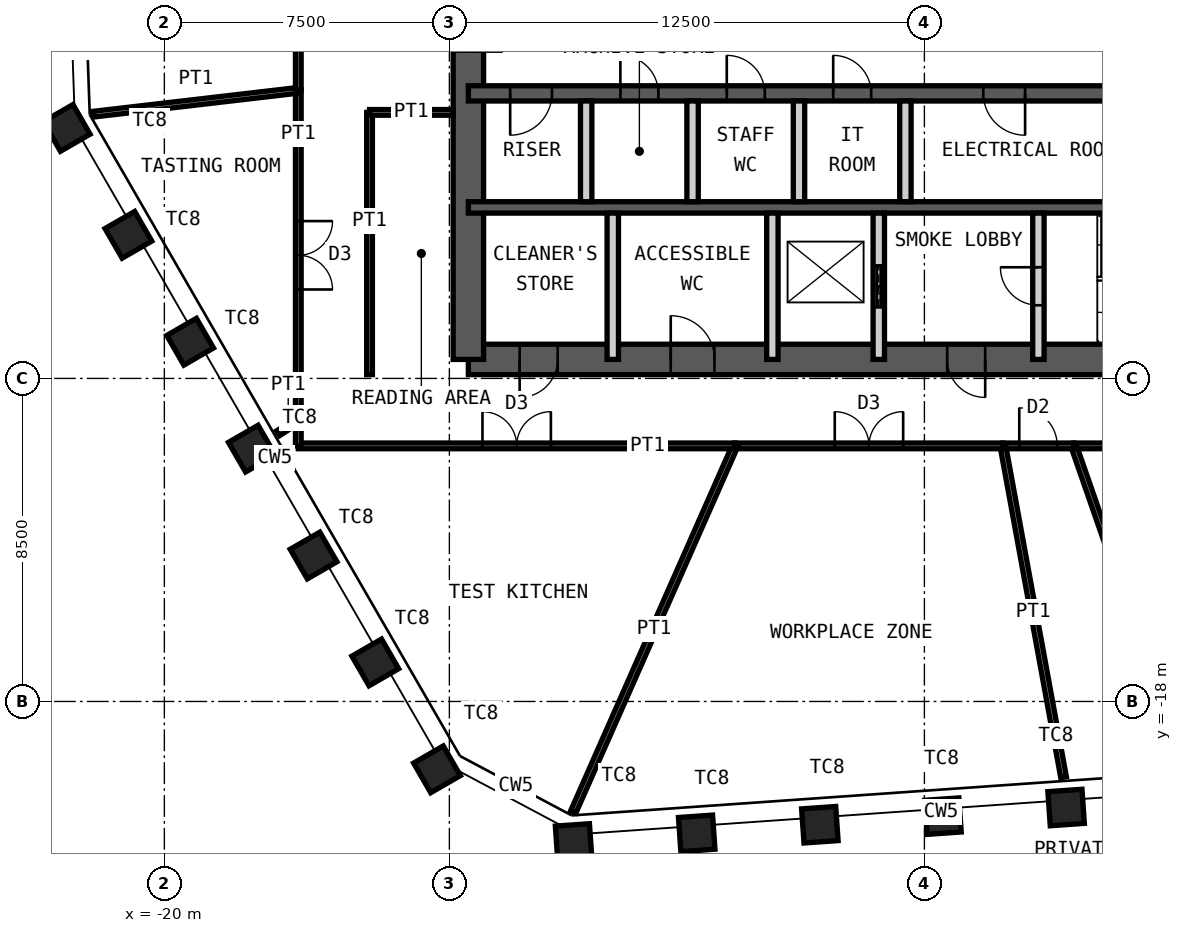
"""IFC4 building model, lengths in metres.
Left out: names, types, materials, properties, quantities, classifications, styles, units other than length and angle.
Written with IfcOpenShell. Run it as: python <this file> out.ifc"""

import sys

from ifc_helpers import new_model, si_unit, direction, frame, frame_2d, origin, origin_2d, place, context, subcontext, project, spatial, rectangle, hollow_rectangle, extrude, element, fill, save


model = new_model("IFC4")
c1 = context("Model", 3, precision=1e-05, world=origin(), true_north=direction((0.0, 1.0)))
c2 = subcontext(c1, "Body", "Model", "MODEL_VIEW")
j1 = project(units=[si_unit("LENGTHUNIT", "METRE"), si_unit("PLANEANGLEUNIT", "RADIAN")], contexts=[c1])
p1 = place(None, origin())
s1 = spatial("IfcSite", under=j1, at=p1, CompositionType="ELEMENT")
p2 = place(p1, origin())
s2 = spatial("IfcBuilding", under=s1, at=p2, CompositionType="ELEMENT")
p3 = place(p2, frame((0.0, 0.0, 316.6)))
s3 = spatial("IfcBuildingStorey", under=s2, at=p3, CompositionType="ELEMENT", Elevation=316.6)
for number, where, z_axis, x_axis in (
    (1, (3.729, -20.791, 0.0), (0.0, 0.0, 1.0), (0.998, 0.07, 0.0)),
    (2, (0.489, -21.017, 0.0), (0.0, 0.0, 1.0), (0.998, 0.07, 0.0)),
    (3, (-2.751, -21.244, 0.0), (0.0, 0.0, 1.0), (0.998, 0.07, 0.0)),
    (4, (-5.991, -21.47, 0.0), (0.0, 0.0, 1.0), (0.998, 0.07, 0.0)),
    (5, (-9.231, -21.697, 0.0), (0.0, 0.0, 1.0), (0.998, 0.07, 0.0)),
    (6, (-12.825, -19.786, 0.0), (0.0, 0.0, 1.0), (0.5, -0.866, 0.0)),
    (7, (-14.449, -16.973, 0.0), (0.0, 0.0, 1.0), (0.5, -0.866, 0.0)),
    (8, (-16.073, -14.16, 0.0), (0.0, 0.0, 1.0), (0.5, -0.866, 0.0)),
    (9, (-17.698, -11.347, 0.0), (0.0, 0.0, 1.0), (0.5, -0.866, 0.0)),
    (10, (-19.322, -8.534, 0.0), (0.0, 0.0, 1.0), (0.5, -0.866, 0.0)),
    (11, (-20.946, -5.721, 0.0), (0.0, 0.0, 1.0), (0.5, -0.866, 0.0)),
    (12, (-22.57, -2.908, 0.0), (0.0, 0.0, 1.0), (0.5, -0.866, 0.0)),
):
    element("IfcColumn", number, at=place(p3, frame(where, z_axis=z_axis, x_axis=x_axis)), inside=s3, PredefinedType="COLUMN", context=c2, shape_type="SweptSolid", body=[
        extrude(hollow_rectangle(XDim=0.9, YDim=0.9, WallThickness=0.05, at=origin_2d()), origin(), (0.0, 0.0, 1.0), 4.2),
    ])
p4 = place(p3, frame((-12.0, -9.0, 0.0), z_axis=(0.0, 0.0, 1.0), x_axis=(1.0, 0.0, 0.0)))
e13 = element("IfcWall", 13, at=p4, inside=s3, PredefinedType="SHEAR", context=c2, shape_type="SweptSolid", body=[
    extrude(rectangle(XDim=24.0, YDim=0.8, at=frame_2d((12.0, 0.0))), origin(), (0.0, 0.0, 1.0), 4.2),
])
p5 = place(p4, frame((1.35, 0.0, 0.0)))
e14 = element("IfcOpeningElement", 14, at=p5, cuts=e13, PredefinedType="OPENING", context=c2, shape_type="SweptSolid", body=[
    extrude(rectangle(XDim=1.0, YDim=2.1, at=frame_2d((0.5, 1.05))), frame((0.0, 0.41, 0.0), z_axis=(0.0, -1.0, 0.0), x_axis=(1.0, 0.0, 0.0)), (0.0, 0.0, 1.0), 0.82),
])
p6 = place(p4, frame((5.325, 0.0, 0.0)))
e15 = element("IfcOpeningElement", 15, at=p6, cuts=e13, PredefinedType="OPENING", context=c2, shape_type="SweptSolid", body=[
    extrude(rectangle(XDim=1.15, YDim=2.1, at=frame_2d((0.575, 1.05))), frame((0.0, 0.41, 0.0), z_axis=(0.0, -1.0, 0.0), x_axis=(1.0, 0.0, 0.0)), (0.0, 0.0, 1.0), 0.82),
])
p7 = place(p4, frame((12.6, 0.0, 0.0)))
e16 = element("IfcOpeningElement", 16, at=p7, cuts=e13, PredefinedType="OPENING", context=c2, shape_type="SweptSolid", body=[
    extrude(rectangle(XDim=1.0, YDim=2.1, at=frame_2d((0.5, 1.05))), frame((0.0, 0.41, 0.0), z_axis=(0.0, -1.0, 0.0), x_axis=(1.0, 0.0, 0.0)), (0.0, 0.0, 1.0), 0.82),
])
p8 = place(p3, frame((-12.0, -9.0, 0.0), z_axis=(0.0, 0.0, 1.0), x_axis=(0.0, 1.0, 0.0)))
e17 = element("IfcWall", 17, at=p8, inside=s3, PredefinedType="SHEAR", context=c2, shape_type="SweptSolid", body=[
    extrude(rectangle(XDim=18.0, YDim=0.8, at=frame_2d((9.0, 0.0))), origin(), (0.0, 0.0, 1.0), 4.2),
])
p9 = place(p8, frame((8.1, 0.0, 0.0)))
e18 = element("IfcOpeningElement", 18, at=p9, cuts=e17, PredefinedType="OPENING", context=c2, shape_type="SweptSolid", body=[
    extrude(rectangle(XDim=1.8, YDim=2.1, at=frame_2d((0.9, 1.05))), frame((0.0, 0.41, 0.0), z_axis=(0.0, -1.0, 0.0), x_axis=(1.0, 0.0, 0.0)), (0.0, 0.0, 1.0), 0.82),
])
p10 = place(p3, frame((-12.0, -2.0, 0.0), z_axis=(0.0, 0.0, 1.0), x_axis=(1.0, 0.0, 0.0)))
e19 = element("IfcWall", 19, at=p10, inside=s3, PredefinedType="SHEAR", context=c2, shape_type="SweptSolid", body=[
    extrude(rectangle(XDim=24.0, YDim=0.4, at=frame_2d((12.0, 0.0))), origin(), (0.0, 0.0, 1.0), 4.2),
])
p11 = place(p10, frame((1.1, 0.0, 0.0)))
e20 = element("IfcOpeningElement", 20, at=p11, cuts=e19, PredefinedType="OPENING", context=c2, shape_type="SweptSolid", body=[
    extrude(rectangle(XDim=1.1, YDim=2.1, at=frame_2d((0.55, 1.05))), frame((0.0, 0.21, 0.0), z_axis=(0.0, -1.0, 0.0), x_axis=(1.0, 0.0, 0.0)), (0.0, 0.0, 1.0), 0.42),
])
p12 = place(p10, frame((13.55, 0.0, 0.0)))
e21 = element("IfcOpeningElement", 21, at=p12, cuts=e19, PredefinedType="OPENING", context=c2, shape_type="SweptSolid", body=[
    extrude(rectangle(XDim=1.1, YDim=2.1, at=frame_2d((0.55, 1.05))), frame((0.0, 0.21, 0.0), z_axis=(0.0, -1.0, 0.0), x_axis=(1.0, 0.0, 0.0)), (0.0, 0.0, 1.0), 0.42),
])
p13 = place(p10, frame((20.7, 0.0, 0.0)))
e22 = element("IfcOpeningElement", 22, at=p13, cuts=e19, PredefinedType="OPENING", context=c2, shape_type="SweptSolid", body=[
    extrude(rectangle(XDim=1.1, YDim=2.1, at=frame_2d((0.55, 1.05))), frame((0.0, 0.21, 0.0), z_axis=(0.0, -1.0, 0.0), x_axis=(1.0, 0.0, 0.0)), (0.0, 0.0, 1.0), 0.42),
])
p14 = place(p10, frame((4.0, 0.0, 0.0)))
e23 = element("IfcOpeningElement", 23, at=p14, cuts=e19, PredefinedType="OPENING", context=c2, shape_type="SweptSolid", body=[
    extrude(rectangle(XDim=1.0, YDim=2.1, at=frame_2d((0.5, 1.05))), frame((0.0, 0.21, 0.0), z_axis=(0.0, -1.0, 0.0), x_axis=(1.0, 0.0, 0.0)), (0.0, 0.0, 1.0), 0.42),
])
p15 = place(p10, frame((6.8, 0.0, 0.0)))
e24 = element("IfcOpeningElement", 24, at=p15, cuts=e19, PredefinedType="OPENING", context=c2, shape_type="SweptSolid", body=[
    extrude(rectangle(XDim=1.0, YDim=2.1, at=frame_2d((0.5, 1.05))), frame((0.0, 0.21, 0.0), z_axis=(0.0, -1.0, 0.0), x_axis=(1.0, 0.0, 0.0)), (0.0, 0.0, 1.0), 0.42),
])
p16 = place(p10, frame((9.6, 0.0, 0.0)))
e25 = element("IfcOpeningElement", 25, at=p16, cuts=e19, PredefinedType="OPENING", context=c2, shape_type="SweptSolid", body=[
    extrude(rectangle(XDim=1.0, YDim=2.1, at=frame_2d((0.5, 1.05))), frame((0.0, 0.21, 0.0), z_axis=(0.0, -1.0, 0.0), x_axis=(1.0, 0.0, 0.0)), (0.0, 0.0, 1.0), 0.42),
])
p17 = place(p3, frame((-12.0, -5.0, 0.0), z_axis=(0.0, 0.0, 1.0), x_axis=(1.0, 0.0, 0.0)))
e26 = element("IfcWall", 26, at=p17, inside=s3, PredefinedType="SHEAR", context=c2, shape_type="SweptSolid", body=[
    extrude(rectangle(XDim=24.0, YDim=0.3, at=frame_2d((12.0, 0.0))), origin(), (0.0, 0.0, 1.0), 4.2),
])
for number, where, z_axis, x_axis in (
    (27, (-8.9, -4.85, 0.0), (0.0, 0.0, 1.0), (0.0, 1.0, 0.0)),
    (28, (-6.1, -4.85, 0.0), (0.0, 0.0, 1.0), (0.0, 1.0, 0.0)),
    (29, (-3.3, -4.85, 0.0), (0.0, 0.0, 1.0), (0.0, 1.0, 0.0)),
    (30, (-0.5, -4.85, 0.0), (0.0, 0.0, 1.0), (0.0, 1.0, 0.0)),
):
    element("IfcWall", number, at=place(p3, frame(where, z_axis=z_axis, x_axis=x_axis)), inside=s3, PredefinedType="PARTITIONING", context=c2, shape_type="SweptSolid", body=[
        extrude(rectangle(XDim=2.65, YDim=0.3, at=frame_2d((1.325, 0.0))), origin(), (0.0, 0.0, 1.0), 3.98),
    ])
for number, where, z_axis, x_axis in (
    (31, (-8.2, -9.0, 0.0), (0.0, 0.0, 1.0), (0.0, 1.0, 0.0)),
    (32, (-4.0, -9.0, 0.0), (0.0, 0.0, 1.0), (0.0, 1.0, 0.0)),
):
    element("IfcWall", number, at=place(p3, frame(where, z_axis=z_axis, x_axis=x_axis)), inside=s3, PredefinedType="PARTITIONING", context=c2, shape_type="SweptSolid", body=[
        extrude(rectangle(XDim=3.85, YDim=0.3, at=frame_2d((1.925, 0.0))), origin(), (0.0, 0.0, 1.0), 3.98),
    ])
p18 = place(p3, frame((-1.2, -9.0, 0.0), z_axis=(0.0, 0.0, 1.0), x_axis=(0.0, 1.0, 0.0)))
e33 = element("IfcWall", 33, at=p18, inside=s3, PredefinedType="PARTITIONING", context=c2, shape_type="SweptSolid", body=[
    extrude(rectangle(XDim=3.85, YDim=0.3, at=frame_2d((1.925, 0.0))), origin(), (0.0, 0.0, 1.0), 3.98),
])
p19 = place(p18, frame((1.375, 0.0, 0.0)))
e34 = element("IfcOpeningElement", 34, at=p19, cuts=e33, PredefinedType="OPENING", context=c2, shape_type="SweptSolid", body=[
    extrude(rectangle(XDim=1.1, YDim=2.4, at=frame_2d((0.55, 1.2))), frame((0.0, 0.16, 0.0), z_axis=(0.0, -1.0, 0.0), x_axis=(1.0, 0.0, 0.0)), (0.0, 0.0, 1.0), 0.32),
])
p20 = place(p3, frame((3.0, -9.0, 0.0), z_axis=(0.0, 0.0, 1.0), x_axis=(0.0, 1.0, 0.0)))
e35 = element("IfcWall", 35, at=p20, inside=s3, PredefinedType="PARTITIONING", context=c2, shape_type="SweptSolid", body=[
    extrude(rectangle(XDim=3.85, YDim=0.3, at=frame_2d((1.925, 0.0))), origin(), (0.0, 0.0, 1.0), 3.98),
])
p21 = place(p20, frame((1.425, 0.0, 0.0)))
e36 = element("IfcOpeningElement", 36, at=p21, cuts=e35, PredefinedType="OPENING", context=c2, shape_type="SweptSolid", body=[
    extrude(rectangle(XDim=1.0, YDim=2.1, at=frame_2d((0.5, 1.05))), frame((0.0, 0.16, 0.0), z_axis=(0.0, -1.0, 0.0), x_axis=(1.0, 0.0, 0.0)), (0.0, 0.0, 1.0), 0.32),
])
p22 = place(p3, frame((8.387, -11.275, 0.0), z_axis=(0.0, 0.0, 1.0), x_axis=(-1.0, 0.0, 0.0)))
e37 = element("IfcWall", 37, at=p22, inside=s3, PredefinedType="PARTITIONING", context=c2, shape_type="SweptSolid", body=[
    extrude(rectangle(XDim=4.459, YDim=0.15, at=frame_2d((2.23, 0.0))), origin(), (0.0, 0.0, 1.0), 4.03),
])
p23 = place(p22, frame((1.73, 0.0, 0.0)))
e38 = element("IfcOpeningElement", 38, at=p23, cuts=e37, PredefinedType="OPENING", context=c2, shape_type="SweptSolid", body=[
    extrude(rectangle(XDim=1.0, YDim=2.4, at=frame_2d((0.5, 1.2))), frame((0.0, 0.085, 0.0), z_axis=(0.0, -1.0, 0.0), x_axis=(1.0, 0.0, 0.0)), (0.0, 0.0, 1.0), 0.17),
])
p24 = place(p3, frame((6.888, -19.771, 0.0), z_axis=(0.0, 0.0, 1.0), x_axis=(-0.328987878601, 0.944334144111, 0.0)))
e39 = element("IfcWall", 39, at=p24, inside=s3, PredefinedType="PARTITIONING", context=c2, shape_type="SweptSolid", body=[
    extrude(rectangle(XDim=8.997, YDim=0.15, at=frame_2d((4.499, 0.0))), origin(), (0.0, 0.0, 1.0), 3.33),
])
p25 = place(p3, frame((3.928, -11.275, 0.0), z_axis=(0.0, 0.0, 1.0), x_axis=(-1.0, 0.0, 0.0)))
e40 = element("IfcWall", 40, at=p25, inside=s3, PredefinedType="PARTITIONING", context=c2, shape_type="SweptSolid", body=[
    extrude(rectangle(XDim=1.863, YDim=0.15, at=frame_2d((0.931, 0.0))), origin(), (0.0, 0.0, 1.0), 4.03),
])
p26 = place(p25, frame((0.431, 0.0, 0.0)))
e41 = element("IfcOpeningElement", 41, at=p26, cuts=e40, PredefinedType="OPENING", context=c2, shape_type="SweptSolid", body=[
    extrude(rectangle(XDim=1.0, YDim=2.4, at=frame_2d((0.5, 1.2))), frame((0.0, 0.085, 0.0), z_axis=(0.0, -1.0, 0.0), x_axis=(1.0, 0.0, 0.0)), (0.0, 0.0, 1.0), 0.17),
])
p27 = place(p3, frame((3.662, -19.994, 0.0), z_axis=(0.0, 0.0, 1.0), x_axis=(-0.180184416856, 0.983632846098, 0.0)))
e42 = element("IfcWall", 42, at=p27, inside=s3, PredefinedType="PARTITIONING", context=c2, shape_type="SweptSolid", body=[
    extrude(rectangle(XDim=8.864, YDim=0.15, at=frame_2d((4.432, 0.0))), origin(), (0.0, 0.0, 1.0), 3.33),
])
p28 = place(p3, frame((2.065, -11.275, 0.0), z_axis=(0.0, 0.0, 1.0), x_axis=(-1.0, 0.0, 0.0)))
e43 = element("IfcWall", 43, at=p28, inside=s3, PredefinedType="PARTITIONING", context=c2, shape_type="SweptSolid", body=[
    extrude(rectangle(XDim=7.048, YDim=0.15, at=frame_2d((3.524, 0.0))), origin(), (0.0, 0.0, 1.0), 4.03),
])
p29 = place(p28, frame((2.624, 0.0, 0.0)))
e44 = element("IfcOpeningElement", 44, at=p29, cuts=e43, PredefinedType="OPENING", context=c2, shape_type="SweptSolid", body=[
    extrude(rectangle(XDim=1.8, YDim=2.4, at=frame_2d((0.9, 1.2))), frame((0.0, 0.085, 0.0), z_axis=(0.0, -1.0, 0.0), x_axis=(1.0, 0.0, 0.0)), (0.0, 0.0, 1.0), 0.17),
])
p30 = place(p3, frame((-9.24, -20.907, 0.0), z_axis=(0.0, 0.0, 1.0), x_axis=(0.404227449851, 0.91465849845, 0.0)))
e45 = element("IfcWall", 45, at=p30, inside=s3, PredefinedType="PARTITIONING", context=c2, shape_type="SweptSolid", body=[
    extrude(rectangle(XDim=10.531, YDim=0.15, at=frame_2d((5.265, 0.0))), origin(), (0.0, 0.0, 1.0), 2.93),
])
p31 = place(p3, frame((-4.983, -11.275, 0.0), z_axis=(0.0, 0.0, 1.0), x_axis=(-1.0, 0.0, 0.0)))
e46 = element("IfcWall", 46, at=p31, inside=s3, PredefinedType="PARTITIONING", context=c2, shape_type="SweptSolid", body=[
    extrude(rectangle(XDim=11.492, YDim=0.15, at=frame_2d((5.746, 0.0))), origin(), (0.0, 0.0, 1.0), 4.03),
])
p32 = place(p31, frame((4.846, 0.0, 0.0)))
e47 = element("IfcOpeningElement", 47, at=p32, cuts=e46, PredefinedType="OPENING", context=c2, shape_type="SweptSolid", body=[
    extrude(rectangle(XDim=1.8, YDim=2.4, at=frame_2d((0.9, 1.2))), frame((0.0, 0.085, 0.0), z_axis=(0.0, -1.0, 0.0), x_axis=(1.0, 0.0, 0.0)), (0.0, 0.0, 1.0), 0.17),
])
p33 = place(p3, frame((-16.475, -11.275, 0.0), z_axis=(0.0, 0.0, 1.0), x_axis=(0.0, 1.0, 0.0)))
e48 = element("IfcWall", 48, at=p33, inside=s3, PredefinedType="PARTITIONING", context=c2, shape_type="SweptSolid", body=[
    extrude(rectangle(XDim=0.674, YDim=0.15, at=frame_2d((0.337, 0.0))), origin(), (0.0, 0.0, 1.0), 4.03),
])
p34 = place(p3, frame((-17.007, -10.943, 0.0), z_axis=(0.0, 0.0, 1.0), x_axis=(0.840789611822, 0.541362012568, 0.0)))
e49 = element("IfcWall", 49, at=p34, inside=s3, PredefinedType="PARTITIONING", context=c2, shape_type="SweptSolid", body=[
    extrude(rectangle(XDim=0.633, YDim=0.15, at=frame_2d((0.316, 0.0))), origin(), (0.0, 0.0, 1.0), 3.33),
])
p35 = place(p3, frame((-16.475, -10.601, 0.0), z_axis=(0.0, 0.0, 1.0), x_axis=(0.0, 1.0, 0.0)))
e50 = element("IfcWall", 50, at=p35, inside=s3, PredefinedType="PARTITIONING", context=c2, shape_type="SweptSolid", body=[
    extrude(rectangle(XDim=8.681, YDim=0.15, at=frame_2d((4.341, 0.0))), origin(), (0.0, 0.0, 1.0), 4.03),
])
p36 = place(p35, frame((3.441, 0.0, 0.0)))
e51 = element("IfcOpeningElement", 51, at=p36, cuts=e50, PredefinedType="OPENING", context=c2, shape_type="SweptSolid", body=[
    extrude(rectangle(XDim=1.8, YDim=2.4, at=frame_2d((0.9, 1.2))), frame((0.0, 0.085, 0.0), z_axis=(0.0, -1.0, 0.0), x_axis=(1.0, 0.0, 0.0)), (0.0, 0.0, 1.0), 0.17),
])
p37 = place(p3, frame((-21.864, -2.547, 0.0), z_axis=(0.0, 0.0, 1.0), x_axis=(0.993284789299, 0.115694975458, 0.0)))
e52 = element("IfcWall", 52, at=p37, inside=s3, PredefinedType="PARTITIONING", context=c2, shape_type="SweptSolid", body=[
    extrude(rectangle(XDim=5.425, YDim=0.15, at=frame_2d((2.713, 0.0))), origin(), (0.0, 0.0, 1.0), 2.93),
])
p38 = place(p3, frame((-16.475, -1.919, 0.0), z_axis=(0.0, 0.0, 1.0), x_axis=(0.0, 1.0, 0.0)))
e53 = element("IfcWall", 53, at=p38, inside=s3, PredefinedType="PARTITIONING", context=c2, shape_type="SweptSolid", body=[
    extrude(rectangle(XDim=7.792, YDim=0.15, at=frame_2d((3.896, 0.0))), origin(), (0.0, 0.0, 1.0), 4.03),
])
p39 = place(p38, frame((3.396, 0.0, 0.0)))
e54 = element("IfcOpeningElement", 54, at=p39, cuts=e53, PredefinedType="OPENING", context=c2, shape_type="SweptSolid", body=[
    extrude(rectangle(XDim=1.0, YDim=2.4, at=frame_2d((0.5, 1.2))), frame((0.0, 0.085, 0.0), z_axis=(0.0, -1.0, 0.0), x_axis=(1.0, 0.0, 0.0)), (0.0, 0.0, 1.0), 0.17),
])
p40 = place(p3, frame((-14.6, -9.4, 0.0), z_axis=(0.0, 0.0, 1.0), x_axis=(0.0, 1.0, 0.0)))
e55 = element("IfcWall", 55, at=p40, inside=s3, PredefinedType="PARTITIONING", context=c2, shape_type="SweptSolid", body=[
    extrude(rectangle(XDim=6.9, YDim=0.15, at=frame_2d((3.45, 0.0))), origin(), (0.0, 0.0, 1.0), 4.03),
])
p41 = place(p3, frame((-12.4, -2.5, 0.0), z_axis=(0.0, 0.0, 1.0), x_axis=(-1.0, 0.0, 0.0)))
e56 = element("IfcWall", 56, at=p41, inside=s3, PredefinedType="PARTITIONING", context=c2, shape_type="SweptSolid", body=[
    extrude(rectangle(XDim=2.2, YDim=0.15, at=frame_2d((1.1, 0.0))), origin(), (0.0, 0.0, 1.0), 3.53),
])
p42 = place(p5, origin())
e57 = element("IfcDoor", 57, at=p42, inside=s3, OperationType="SINGLE_SWING_LEFT", PredefinedType="DOOR", context=c2, shape_type="SweptSolid", body=[
    extrude(rectangle(XDim=1.0, YDim=2.1, at=frame_2d((0.5, 1.05))), frame((0.0, 0.025, 0.0), z_axis=(0.0, -1.0, 0.0), x_axis=(1.0, 0.0, 0.0)), (0.0, 0.0, 1.0), 0.05),
])
fill(e14, e57)
p43 = place(p6, origin())
e58 = element("IfcDoor", 58, at=p43, inside=s3, OperationType="SINGLE_SWING_RIGHT", PredefinedType="DOOR", context=c2, shape_type="SweptSolid", body=[
    extrude(rectangle(XDim=1.15, YDim=2.1, at=frame_2d((0.575, 1.05))), frame((0.0, 0.025, 0.0), z_axis=(0.0, -1.0, 0.0), x_axis=(1.0, 0.0, 0.0)), (0.0, 0.0, 1.0), 0.05),
])
fill(e15, e58)
p44 = place(p7, origin())
e59 = element("IfcDoor", 59, at=p44, inside=s3, OperationType="SINGLE_SWING_RIGHT", PredefinedType="DOOR", context=c2, shape_type="SweptSolid", body=[
    extrude(rectangle(XDim=1.0, YDim=2.1, at=frame_2d((0.5, 1.05))), frame((0.0, 0.025, 0.0), z_axis=(0.0, -1.0, 0.0), x_axis=(1.0, 0.0, 0.0)), (0.0, 0.0, 1.0), 0.05),
])
fill(e16, e59)
p45 = place(p21, origin())
e60 = element("IfcDoor", 60, at=p45, inside=s3, OperationType="SINGLE_SWING_LEFT", PredefinedType="DOOR", context=c2, shape_type="SweptSolid", body=[
    extrude(rectangle(XDim=1.0, YDim=2.1, at=frame_2d((0.5, 1.05))), frame((0.0, 0.025, 0.0), z_axis=(0.0, -1.0, 0.0), x_axis=(1.0, 0.0, 0.0)), (0.0, 0.0, 1.0), 0.05),
])
fill(e36, e60)
p46 = place(p11, origin())
e61 = element("IfcDoor", 61, at=p46, inside=s3, OperationType="SINGLE_SWING_LEFT", PredefinedType="DOOR", context=c2, shape_type="SweptSolid", body=[
    extrude(rectangle(XDim=1.1, YDim=2.1, at=frame_2d((0.55, 1.05))), frame((0.0, 0.025, 0.0), z_axis=(0.0, -1.0, 0.0), x_axis=(1.0, 0.0, 0.0)), (0.0, 0.0, 1.0), 0.05),
])
fill(e20, e61)
p47 = place(p12, origin())
e62 = element("IfcDoor", 62, at=p47, inside=s3, OperationType="SINGLE_SWING_RIGHT", PredefinedType="DOOR", context=c2, shape_type="SweptSolid", body=[
    extrude(rectangle(XDim=1.1, YDim=2.1, at=frame_2d((0.55, 1.05))), frame((0.0, 0.025, 0.0), z_axis=(0.0, -1.0, 0.0), x_axis=(1.0, 0.0, 0.0)), (0.0, 0.0, 1.0), 0.05),
])
fill(e21, e62)
p48 = place(p19, origin())
e63 = element("IfcDoor", 63, at=p48, inside=s3, OperationType="DOUBLE_DOOR_SLIDING", PredefinedType="DOOR", context=c2, shape_type="SweptSolid", body=[
    extrude(rectangle(XDim=1.1, YDim=2.4, at=frame_2d((0.55, 1.2))), frame((0.0, 0.025, 0.0), z_axis=(0.0, -1.0, 0.0), x_axis=(1.0, 0.0, 0.0)), (0.0, 0.0, 1.0), 0.05),
])
fill(e34, e63)
p49 = place(p14, origin())
e64 = element("IfcDoor", 64, at=p49, inside=s3, OperationType="SINGLE_SWING_RIGHT", PredefinedType="DOOR", context=c2, shape_type="SweptSolid", body=[
    extrude(rectangle(XDim=1.0, YDim=2.1, at=frame_2d((0.5, 1.05))), frame((0.0, 0.025, 0.0), z_axis=(0.0, -1.0, 0.0), x_axis=(1.0, 0.0, 0.0)), (0.0, 0.0, 1.0), 0.05),
])
fill(e23, e64)
p50 = place(p15, origin())
e65 = element("IfcDoor", 65, at=p50, inside=s3, OperationType="SINGLE_SWING_RIGHT", PredefinedType="DOOR", context=c2, shape_type="SweptSolid", body=[
    extrude(rectangle(XDim=1.0, YDim=2.1, at=frame_2d((0.5, 1.05))), frame((0.0, 0.025, 0.0), z_axis=(0.0, -1.0, 0.0), x_axis=(1.0, 0.0, 0.0)), (0.0, 0.0, 1.0), 0.05),
])
fill(e24, e65)
p51 = place(p16, origin())
e66 = element("IfcDoor", 66, at=p51, inside=s3, OperationType="SINGLE_SWING_RIGHT", PredefinedType="DOOR", context=c2, shape_type="SweptSolid", body=[
    extrude(rectangle(XDim=1.0, YDim=2.1, at=frame_2d((0.5, 1.05))), frame((0.0, 0.025, 0.0), z_axis=(0.0, -1.0, 0.0), x_axis=(1.0, 0.0, 0.0)), (0.0, 0.0, 1.0), 0.05),
])
fill(e25, e66)
p52 = place(p26, origin())
e67 = element("IfcDoor", 67, at=p52, inside=s3, OperationType="SINGLE_SWING_RIGHT", PredefinedType="DOOR", context=c2, shape_type="SweptSolid", body=[
    extrude(rectangle(XDim=1.0, YDim=2.4, at=frame_2d((0.5, 1.2))), frame((0.0, 0.025, 0.0), z_axis=(0.0, -1.0, 0.0), x_axis=(1.0, 0.0, 0.0)), (0.0, 0.0, 1.0), 0.05),
])
fill(e41, e67)
p53 = place(p29, origin())
e68 = element("IfcDoor", 68, at=p53, inside=s3, OperationType="DOUBLE_DOOR_DOUBLE_SWING", PredefinedType="DOOR", context=c2, shape_type="SweptSolid", body=[
    extrude(rectangle(XDim=1.8, YDim=2.4, at=frame_2d((0.9, 1.2))), frame((0.0, 0.025, 0.0), z_axis=(0.0, -1.0, 0.0), x_axis=(1.0, 0.0, 0.0)), (0.0, 0.0, 1.0), 0.05),
])
fill(e44, e68)
p54 = place(p32, origin())
e69 = element("IfcDoor", 69, at=p54, inside=s3, OperationType="DOUBLE_DOOR_DOUBLE_SWING", PredefinedType="DOOR", context=c2, shape_type="SweptSolid", body=[
    extrude(rectangle(XDim=1.8, YDim=2.4, at=frame_2d((0.9, 1.2))), frame((0.0, 0.025, 0.0), z_axis=(0.0, -1.0, 0.0), x_axis=(1.0, 0.0, 0.0)), (0.0, 0.0, 1.0), 0.05),
])
fill(e47, e69)
p55 = place(p36, origin())
e70 = element("IfcDoor", 70, at=p55, inside=s3, OperationType="DOUBLE_DOOR_DOUBLE_SWING", PredefinedType="DOOR", context=c2, shape_type="SweptSolid", body=[
    extrude(rectangle(XDim=1.8, YDim=2.4, at=frame_2d((0.9, 1.2))), frame((0.0, 0.025, 0.0), z_axis=(0.0, -1.0, 0.0), x_axis=(1.0, 0.0, 0.0)), (0.0, 0.0, 1.0), 0.05),
])
fill(e51, e70)
save(model, sys.argv[1])
